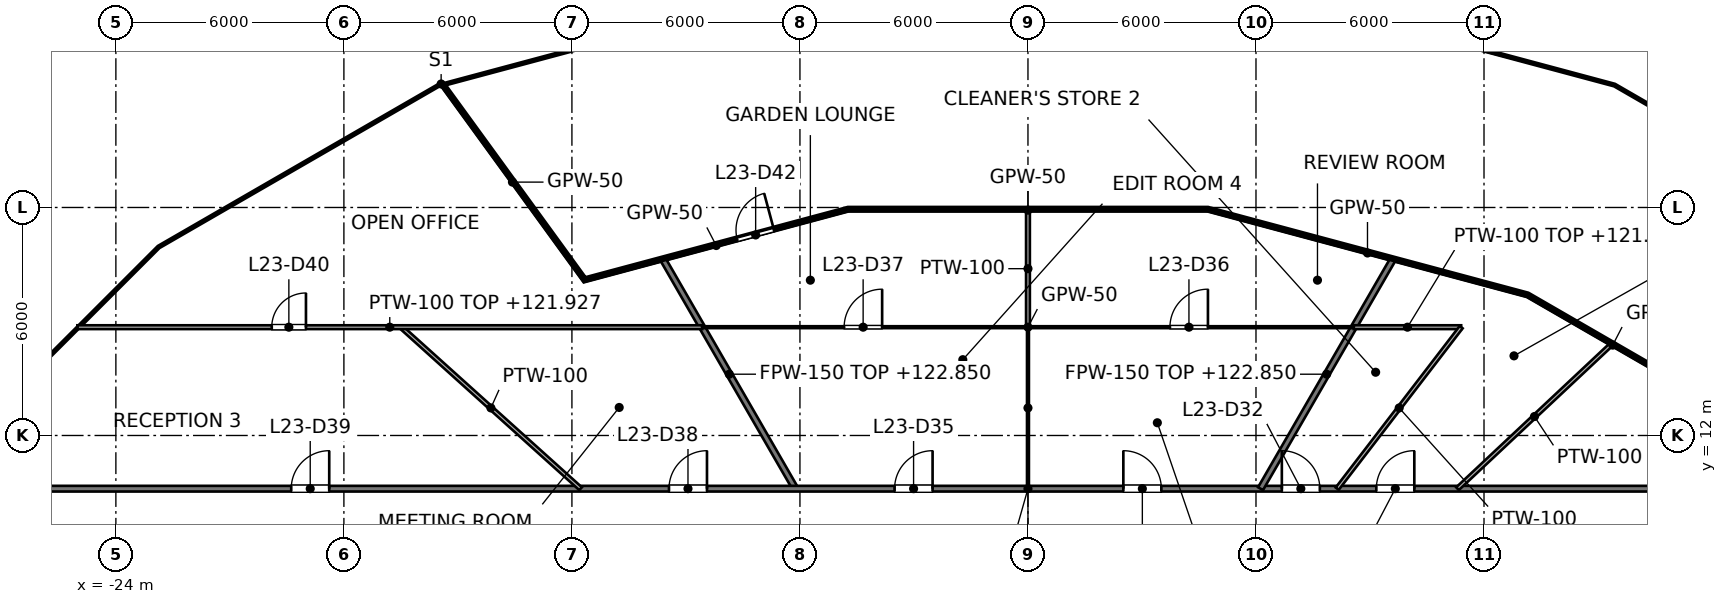
"""IFC4 building model, lengths in metres.
Left out: names, types, materials, properties, quantities, classifications, styles, units other than length and angle.
Written with IfcOpenShell. Run it as: python <this file> out.ifc"""

import sys

from ifc_helpers import new_model, si_unit, direction, frame, frame_2d, origin, place, context, subcontext, project, spatial, rectangle, extrude, element, fill, save


model = new_model("IFC4")
c1 = context("Model", 3, precision=1e-05, world=origin(), true_north=direction((0.0, 1.0)))
c2 = subcontext(c1, "Body", "Model", "MODEL_VIEW")
j1 = project(units=[si_unit("LENGTHUNIT", "METRE"), si_unit("PLANEANGLEUNIT", "RADIAN")], contexts=[c1])
p1 = place(None, origin())
s1 = spatial("IfcSite", under=j1, at=p1, CompositionType="ELEMENT")
p2 = place(p1, origin())
s2 = spatial("IfcBuilding", under=s1, at=p2, CompositionType="ELEMENT")
p3 = place(p2, frame((0.0, 0.0, 118.8)))
s3 = spatial("IfcBuildingStorey", under=s2, at=p3, CompositionType="ELEMENT", Elevation=118.8)
p4 = place(p3, frame((-9.598, 16.625, 0.0), z_axis=(0.0, 0.0, 1.0), x_axis=(0.499977629202, -0.866038319186, 0.0)))
e1 = element("IfcWall", 1, at=p4, inside=s3, PredefinedType="PARTITIONING", context=c2, shape_type="SweptSolid", body=[
    extrude(rectangle(XDim=6.957, YDim=0.15, at=frame_2d((3.479, 0.0))), origin(), (0.0, 0.0, 1.0), 4.05),
])
p5 = place(p3, frame((-26.0, 10.6, 0.0), z_axis=(0.0, 0.0, 1.0), x_axis=(1.0, 0.0, 0.0)))
e2 = element("IfcWall", 2, at=p5, inside=s3, PredefinedType="PARTITIONING", context=c2, shape_type="SweptSolid", body=[
    extrude(rectangle(XDim=52.0, YDim=0.15, at=frame_2d((26.0, 0.0))), origin(), (0.0, 0.0, 1.0), 3.127),
])
p6 = place(p5, frame((44.052, 0.0, 0.0)))
e3 = element("IfcOpeningElement", 3, at=p6, cuts=e2, PredefinedType="OPENING", context=c2, shape_type="SweptSolid", body=[
    extrude(rectangle(XDim=1.2, YDim=2.1, at=frame_2d((0.6, 1.05))), frame((0.0, 0.075, 0.0), z_axis=(0.0, -1.0, 0.0), x_axis=(1.0, 0.0, 0.0)), (0.0, 0.0, 1.0), 0.15),
])
p7 = place(p5, frame((35.166, 0.0, 0.0)))
e4 = element("IfcOpeningElement", 4, at=p7, cuts=e2, PredefinedType="OPENING", context=c2, shape_type="SweptSolid", body=[
    extrude(rectangle(XDim=1.0, YDim=2.1, at=frame_2d((0.5, 1.05))), frame((0.0, 0.075, 0.0), z_axis=(0.0, -1.0, 0.0), x_axis=(1.0, 0.0, 0.0)), (0.0, 0.0, 1.0), 0.15),
])
p8 = place(p5, frame((32.68, 0.0, 0.0)))
e5 = element("IfcOpeningElement", 5, at=p8, cuts=e2, PredefinedType="OPENING", context=c2, shape_type="SweptSolid", body=[
    extrude(rectangle(XDim=1.0, YDim=2.1, at=frame_2d((0.5, 1.05))), frame((0.0, 0.075, 0.0), z_axis=(0.0, -1.0, 0.0), x_axis=(1.0, 0.0, 0.0)), (0.0, 0.0, 1.0), 0.15),
])
p9 = place(p5, frame((28.51, 0.0, 0.0)))
e6 = element("IfcOpeningElement", 6, at=p9, cuts=e2, PredefinedType="OPENING", context=c2, shape_type="SweptSolid", body=[
    extrude(rectangle(XDim=1.0, YDim=2.1, at=frame_2d((0.5, 1.05))), frame((0.0, 0.075, 0.0), z_axis=(0.0, -1.0, 0.0), x_axis=(1.0, 0.0, 0.0)), (0.0, 0.0, 1.0), 0.15),
])
p10 = place(p5, frame((22.49, 0.0, 0.0)))
e7 = element("IfcOpeningElement", 7, at=p10, cuts=e2, PredefinedType="OPENING", context=c2, shape_type="SweptSolid", body=[
    extrude(rectangle(XDim=1.0, YDim=2.1, at=frame_2d((0.5, 1.05))), frame((0.0, 0.075, 0.0), z_axis=(0.0, -1.0, 0.0), x_axis=(1.0, 0.0, 0.0)), (0.0, 0.0, 1.0), 0.15),
])
p11 = place(p5, frame((16.554, 0.0, 0.0)))
e8 = element("IfcOpeningElement", 8, at=p11, cuts=e2, PredefinedType="OPENING", context=c2, shape_type="SweptSolid", body=[
    extrude(rectangle(XDim=1.0, YDim=2.1, at=frame_2d((0.5, 1.05))), frame((0.0, 0.075, 0.0), z_axis=(0.0, -1.0, 0.0), x_axis=(1.0, 0.0, 0.0)), (0.0, 0.0, 1.0), 0.15),
])
p12 = place(p5, frame((6.614, 0.0, 0.0)))
e9 = element("IfcOpeningElement", 9, at=p12, cuts=e2, PredefinedType="OPENING", context=c2, shape_type="SweptSolid", body=[
    extrude(rectangle(XDim=1.0, YDim=2.1, at=frame_2d((0.5, 1.05))), frame((0.0, 0.075, 0.0), z_axis=(0.0, -1.0, 0.0), x_axis=(1.0, 0.0, 0.0)), (0.0, 0.0, 1.0), 0.15),
])
p13 = place(p3, frame((6.12, 10.6, 0.0), z_axis=(0.0, 0.0, 1.0), x_axis=(0.499992825081, 0.866029546186, 0.0)))
e10 = element("IfcWall", 10, at=p13, inside=s3, PredefinedType="PARTITIONING", context=c2, shape_type="SweptSolid", body=[
    extrude(rectangle(XDim=6.957, YDim=0.15, at=frame_2d((3.478, 0.0))), origin(), (0.0, 0.0, 1.0), 4.05),
])
p14 = place(p3, frame((-15.454, 21.267, 0.0), z_axis=(0.0, 0.0, 1.0), x_axis=(0.587866723906, -0.808957795514, 0.0)))
e11 = element("IfcWall", 11, at=p14, inside=s3, PredefinedType="PARTITIONING", context=c2, shape_type="SweptSolid", body=[
    extrude(rectangle(XDim=6.427, YDim=0.05, at=frame_2d((3.213, 0.0))), origin(), (0.0, 0.0, 1.0), 3.127),
])
p15 = place(p3, frame((13.138, 15.676, 0.0), z_axis=(0.0, 0.0, 1.0), x_axis=(0.866061884255, -0.499936808647, 0.0)))
e12 = element("IfcWall", 12, at=p15, inside=s3, PredefinedType="PARTITIONING", context=c2, shape_type="SweptSolid", body=[
    extrude(rectangle(XDim=5.193, YDim=0.05, at=frame_2d((2.596, 0.0))), origin(), (0.0, 0.0, 1.0), 3.127),
])
p16 = place(p3, frame((4.73, 17.929, 0.0), z_axis=(0.0, 0.0, 1.0), x_axis=(0.96591812857, -0.258847771671, 0.0)))
e13 = element("IfcWall", 13, at=p16, inside=s3, PredefinedType="PARTITIONING", context=c2, shape_type="SweptSolid", body=[
    extrude(rectangle(XDim=8.705, YDim=0.05, at=frame_2d((4.352, 0.0))), origin(), (0.0, 0.0, 1.0), 3.127),
])
p17 = place(p3, frame((-8.573, 14.85, 0.0), z_axis=(0.0, 0.0, 1.0), x_axis=(1.0, 0.0, 0.0)))
e14 = element("IfcWall", 14, at=p17, inside=s3, PredefinedType="PARTITIONING", context=c2, shape_type="SweptSolid", body=[
    extrude(rectangle(XDim=17.146, YDim=0.05, at=frame_2d((8.573, 0.0))), origin(), (0.0, 0.0, 1.0), 3.127),
])
p18 = place(p17, frame((12.309, 0.0, 0.0)))
e15 = element("IfcOpeningElement", 15, at=p18, cuts=e14, PredefinedType="OPENING", context=c2, shape_type="SweptSolid", body=[
    extrude(rectangle(XDim=1.0, YDim=2.1, at=frame_2d((0.5, 1.05))), frame((0.0, 0.025, 0.0), z_axis=(0.0, -1.0, 0.0), x_axis=(1.0, 0.0, 0.0)), (0.0, 0.0, 1.0), 0.05),
])
p19 = place(p17, frame((3.736, 0.0, 0.0)))
e16 = element("IfcOpeningElement", 16, at=p19, cuts=e14, PredefinedType="OPENING", context=c2, shape_type="SweptSolid", body=[
    extrude(rectangle(XDim=1.0, YDim=2.1, at=frame_2d((0.5, 1.05))), frame((0.0, 0.025, 0.0), z_axis=(0.0, -1.0, 0.0), x_axis=(1.0, 0.0, 0.0)), (0.0, 0.0, 1.0), 0.05),
])
p20 = place(p3, frame((-4.73, 17.929, 0.0), z_axis=(0.0, 0.0, 1.0), x_axis=(1.0, 0.0, 0.0)))
e17 = element("IfcWall", 17, at=p20, inside=s3, PredefinedType="PARTITIONING", context=c2, shape_type="SweptSolid", body=[
    extrude(rectangle(XDim=9.46, YDim=0.05, at=frame_2d((4.73, 0.0))), origin(), (0.0, 0.0, 1.0), 3.127),
])
p21 = place(p3, frame((-11.676, 16.068, 0.0), z_axis=(0.0, 0.0, 1.0), x_axis=(0.96592941201, 0.258805662639, 0.0)))
e18 = element("IfcWall", 18, at=p21, inside=s3, PredefinedType="PARTITIONING", context=c2, shape_type="SweptSolid", body=[
    extrude(rectangle(XDim=7.191, YDim=0.05, at=frame_2d((3.596, 0.0))), origin(), (0.0, 0.0, 1.0), 3.127),
])
p22 = place(p21, frame((4.17, 0.0, 0.0)))
e19 = element("IfcOpeningElement", 19, at=p22, cuts=e18, PredefinedType="OPENING", context=c2, shape_type="SweptSolid", body=[
    extrude(rectangle(XDim=1.0, YDim=2.1, at=frame_2d((0.5, 1.05))), frame((0.0, 0.025, 0.0), z_axis=(0.0, -1.0, 0.0), x_axis=(1.0, 0.0, 0.0)), (0.0, 0.0, 1.0), 0.05),
])
p23 = place(p3, frame((0.0, 10.6, 0.0), z_axis=(0.0, 0.0, 1.0), x_axis=(0.0, 1.0, 0.0)))
e20 = element("IfcWall", 20, at=p23, inside=s3, PredefinedType="PARTITIONING", context=c2, shape_type="SweptSolid", body=[
    extrude(rectangle(XDim=4.25, YDim=0.05, at=frame_2d((2.125, 0.0))), origin(), (0.0, 0.0, 1.0), 4.05),
])
p24 = place(p3, frame((-16.492, 14.85, 0.0), z_axis=(0.0, 0.0, 1.0), x_axis=(0.74313548605, -0.669140978698, 0.0)))
e21 = element("IfcWall", 21, at=p24, inside=s3, PredefinedType="PARTITIONING", context=c2, shape_type="SweptSolid", body=[
    extrude(rectangle(XDim=6.351, YDim=0.1, at=frame_2d((3.176, 0.0))), origin(), (0.0, 0.0, 1.0), 4.05),
])
p25 = place(p3, frame((-25.013, 14.85, 0.0), z_axis=(0.0, 0.0, 1.0), x_axis=(1.0, 0.0, 0.0)))
e22 = element("IfcWall", 22, at=p25, inside=s3, PredefinedType="PARTITIONING", context=c2, shape_type="SweptSolid", body=[
    extrude(rectangle(XDim=16.44, YDim=0.1, at=frame_2d((8.22, 0.0))), origin(), (0.0, 0.0, 1.0), 3.127),
])
p26 = place(p25, frame((5.115, 0.0, 0.0)))
e23 = element("IfcOpeningElement", 23, at=p26, cuts=e22, PredefinedType="OPENING", context=c2, shape_type="SweptSolid", body=[
    extrude(rectangle(XDim=0.9, YDim=2.1, at=frame_2d((0.45, 1.05))), frame((0.0, 0.05, 0.0), z_axis=(0.0, -1.0, 0.0), x_axis=(1.0, 0.0, 0.0)), (0.0, 0.0, 1.0), 0.1),
])
p27 = place(p3, frame((8.573, 14.85, 0.0), z_axis=(0.0, 0.0, 1.0), x_axis=(1.0, 0.0, 0.0)))
e24 = element("IfcWall", 24, at=p27, inside=s3, PredefinedType="PARTITIONING", context=c2, shape_type="SweptSolid", body=[
    extrude(rectangle(XDim=2.826, YDim=0.1, at=frame_2d((1.413, 0.0))), origin(), (0.0, 0.0, 1.0), 3.127),
])
p28 = place(p3, frame((11.303, 10.6, 0.0), z_axis=(0.0, 0.0, 1.0), x_axis=(0.72937123746, 0.684118116969, 0.0)))
e25 = element("IfcWall", 25, at=p28, inside=s3, PredefinedType="PARTITIONING", context=c2, shape_type="SweptSolid", body=[
    extrude(rectangle(XDim=5.552, YDim=0.1, at=frame_2d((2.776, 0.0))), origin(), (0.0, 0.0, 1.0), 4.05),
])
p29 = place(p3, frame((8.137, 10.6, 0.0), z_axis=(0.0, 0.0, 1.0), x_axis=(0.608858134489, 0.793279126201, 0.0)))
e26 = element("IfcWall", 26, at=p29, inside=s3, PredefinedType="PARTITIONING", context=c2, shape_type="SweptSolid", body=[
    extrude(rectangle(XDim=5.357, YDim=0.1, at=frame_2d((2.679, 0.0))), origin(), (0.0, 0.0, 1.0), 4.05),
])
p30 = place(p3, frame((0.0, 14.85, 0.0), z_axis=(0.0, 0.0, 1.0), x_axis=(0.0, 1.0, 0.0)))
e27 = element("IfcWall", 27, at=p30, inside=s3, PredefinedType="PARTITIONING", context=c2, shape_type="SweptSolid", body=[
    extrude(rectangle(XDim=3.079, YDim=0.1, at=frame_2d((1.54, 0.0))), origin(), (0.0, 0.0, 1.0), 4.05),
])
p31 = place(p7, origin())
e28 = element("IfcDoor", 28, at=p31, inside=s3, OperationType="SINGLE_SWING_RIGHT", PredefinedType="DOOR", context=c2, shape_type="SweptSolid", body=[
    extrude(rectangle(XDim=1.0, YDim=2.1, at=frame_2d((0.5, 1.05))), frame((0.0, 0.025, 0.0), z_axis=(0.0, -1.0, 0.0), x_axis=(1.0, 0.0, 0.0)), (0.0, 0.0, 1.0), 0.05),
])
fill(e4, e28)
p32 = place(p8, origin())
e29 = element("IfcDoor", 29, at=p32, inside=s3, OperationType="SINGLE_SWING_LEFT", PredefinedType="DOOR", context=c2, shape_type="SweptSolid", body=[
    extrude(rectangle(XDim=1.0, YDim=2.1, at=frame_2d((0.5, 1.05))), frame((0.0, 0.025, 0.0), z_axis=(0.0, -1.0, 0.0), x_axis=(1.0, 0.0, 0.0)), (0.0, 0.0, 1.0), 0.05),
])
fill(e5, e29)
p33 = place(p9, origin())
e30 = element("IfcDoor", 30, at=p33, inside=s3, OperationType="SINGLE_SWING_LEFT", PredefinedType="DOOR", context=c2, shape_type="SweptSolid", body=[
    extrude(rectangle(XDim=1.0, YDim=2.1, at=frame_2d((0.5, 1.05))), frame((0.0, 0.025, 0.0), z_axis=(0.0, -1.0, 0.0), x_axis=(1.0, 0.0, 0.0)), (0.0, 0.0, 1.0), 0.05),
])
fill(e6, e30)
p34 = place(p10, origin())
e31 = element("IfcDoor", 31, at=p34, inside=s3, OperationType="SINGLE_SWING_RIGHT", PredefinedType="DOOR", context=c2, shape_type="SweptSolid", body=[
    extrude(rectangle(XDim=1.0, YDim=2.1, at=frame_2d((0.5, 1.05))), frame((0.0, 0.025, 0.0), z_axis=(0.0, -1.0, 0.0), x_axis=(1.0, 0.0, 0.0)), (0.0, 0.0, 1.0), 0.05),
])
fill(e7, e31)
p35 = place(p18, origin())
e32 = element("IfcDoor", 32, at=p35, inside=s3, OperationType="SINGLE_SWING_RIGHT", PredefinedType="DOOR", context=c2, shape_type="SweptSolid", body=[
    extrude(rectangle(XDim=1.0, YDim=2.1, at=frame_2d((0.5, 1.05))), frame((0.0, 0.025, 0.0), z_axis=(0.0, -1.0, 0.0), x_axis=(1.0, 0.0, 0.0)), (0.0, 0.0, 1.0), 0.05),
])
fill(e15, e32)
p36 = place(p19, origin())
e33 = element("IfcDoor", 33, at=p36, inside=s3, OperationType="SINGLE_SWING_RIGHT", PredefinedType="DOOR", context=c2, shape_type="SweptSolid", body=[
    extrude(rectangle(XDim=1.0, YDim=2.1, at=frame_2d((0.5, 1.05))), frame((0.0, 0.025, 0.0), z_axis=(0.0, -1.0, 0.0), x_axis=(1.0, 0.0, 0.0)), (0.0, 0.0, 1.0), 0.05),
])
fill(e16, e33)
p37 = place(p11, origin())
e34 = element("IfcDoor", 34, at=p37, inside=s3, OperationType="SINGLE_SWING_RIGHT", PredefinedType="DOOR", context=c2, shape_type="SweptSolid", body=[
    extrude(rectangle(XDim=1.0, YDim=2.1, at=frame_2d((0.5, 1.05))), frame((0.0, 0.025, 0.0), z_axis=(0.0, -1.0, 0.0), x_axis=(1.0, 0.0, 0.0)), (0.0, 0.0, 1.0), 0.05),
])
fill(e8, e34)
p38 = place(p12, origin())
e35 = element("IfcDoor", 35, at=p38, inside=s3, OperationType="SINGLE_SWING_RIGHT", PredefinedType="DOOR", context=c2, shape_type="SweptSolid", body=[
    extrude(rectangle(XDim=1.0, YDim=2.1, at=frame_2d((0.5, 1.05))), frame((0.0, 0.025, 0.0), z_axis=(0.0, -1.0, 0.0), x_axis=(1.0, 0.0, 0.0)), (0.0, 0.0, 1.0), 0.05),
])
fill(e9, e35)
p39 = place(p26, origin())
e36 = element("IfcDoor", 36, at=p39, inside=s3, OperationType="SINGLE_SWING_RIGHT", PredefinedType="DOOR", context=c2, shape_type="SweptSolid", body=[
    extrude(rectangle(XDim=0.9, YDim=2.1, at=frame_2d((0.45, 1.05))), frame((0.0, 0.025, 0.0), z_axis=(0.0, -1.0, 0.0), x_axis=(1.0, 0.0, 0.0)), (0.0, 0.0, 1.0), 0.05),
])
fill(e23, e36)
p40 = place(p22, origin())
e37 = element("IfcDoor", 37, at=p40, inside=s3, OperationType="SINGLE_SWING_RIGHT", PredefinedType="DOOR", context=c2, shape_type="SweptSolid", body=[
    extrude(rectangle(XDim=1.0, YDim=2.1, at=frame_2d((0.5, 1.05))), frame((0.0, 0.025, 0.0), z_axis=(0.0, -1.0, 0.0), x_axis=(1.0, 0.0, 0.0)), (0.0, 0.0, 1.0), 0.05),
])
fill(e19, e37)
save(model, sys.argv[1])
